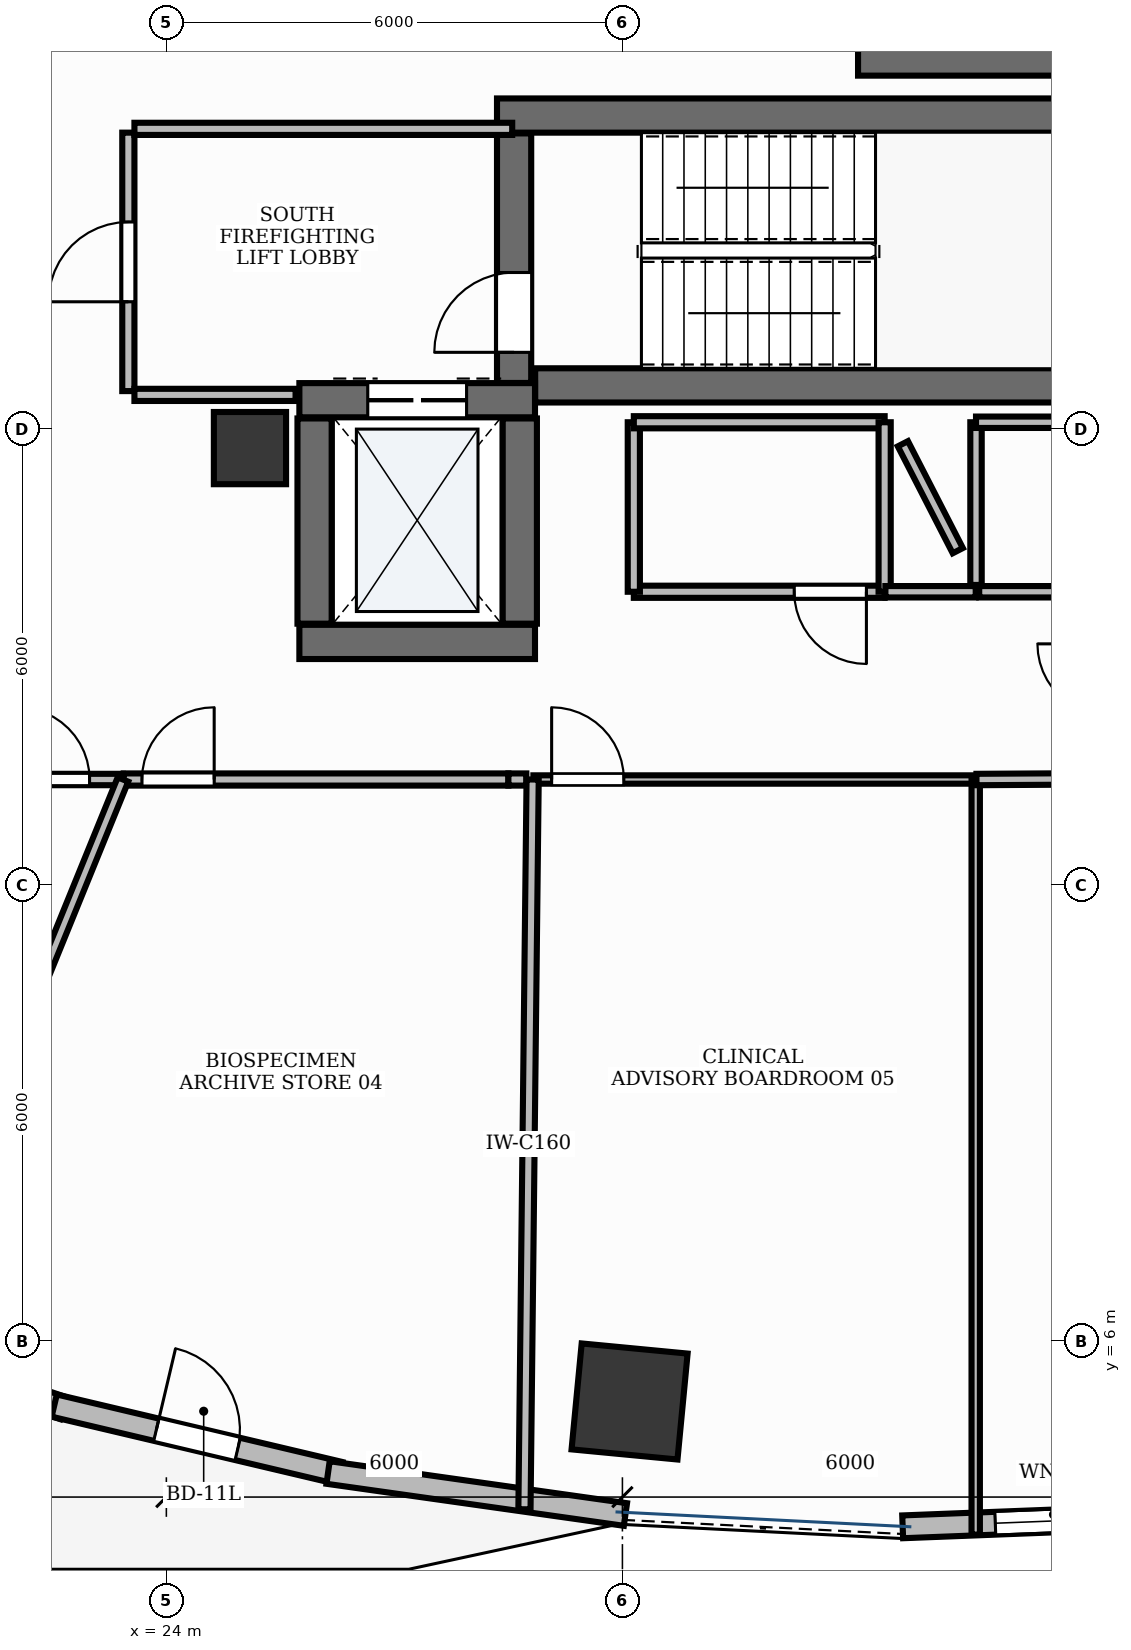
"""IFC4 building model, lengths in metres.
Left out: names, types, materials, properties, quantities, classifications, styles, units other than length and angle.
Written with IfcOpenShell. Run it as: python <this file> out.ifc"""

import sys

from ifc_helpers import new_model, si_unit, direction, frame, frame_2d, origin, origin_2d, place, context, subcontext, project, spatial, rectangle, extrude, element, fill, save


model = new_model("IFC4")
c1 = context("Model", 3, precision=1e-05, world=origin(), true_north=direction((0.0, 1.0)))
c2 = subcontext(c1, "Body", "Model", "MODEL_VIEW")
j1 = project(units=[si_unit("LENGTHUNIT", "METRE"), si_unit("PLANEANGLEUNIT", "RADIAN")], contexts=[c1])
p1 = place(None, origin())
s1 = spatial("IfcSite", under=j1, at=p1, CompositionType="ELEMENT")
p2 = place(p1, origin())
s2 = spatial("IfcBuilding", under=s1, at=p2, CompositionType="ELEMENT")
p3 = place(p2, frame((0.0, 0.0, 38.4)))
s3 = spatial("IfcBuildingStorey", under=s2, at=p3, CompositionType="ELEMENT", Elevation=38.4)
p4 = place(p3, frame((28.852, 18.575, 0.0), z_axis=(0.0, 0.0, 1.0), x_axis=(1.0, 0.0, 0.0)))
e1 = element("IfcWall", 1, at=p4, inside=s3, PredefinedType="SHEAR", context=c2, shape_type="SweptSolid", body=[
    extrude(rectangle(XDim=8.248, YDim=0.45, at=frame_2d((4.124, 0.0))), origin(), (0.0, 0.0, 1.0), 3.9),
])
p5 = place(p3, frame((28.35, 22.125, 0.0), z_axis=(0.0, 0.0, 1.0), x_axis=(1.0, 0.0, 0.0)))
e2 = element("IfcWall", 2, at=p5, inside=s3, PredefinedType="SHEAR", context=c2, shape_type="SweptSolid", body=[
    extrude(rectangle(XDim=8.75, YDim=0.45, at=frame_2d((4.375, 0.0))), origin(), (0.0, 0.0, 1.0), 3.9),
])
p6 = place(p3, frame((28.575, 18.607, 0.0), z_axis=(0.0, 0.0, 1.0), x_axis=(0.0, 1.0, 0.0)))
e3 = element("IfcWall", 3, at=p6, inside=s3, PredefinedType="SHEAR", context=c2, shape_type="SweptSolid", body=[
    extrude(rectangle(XDim=3.283, YDim=0.45, at=frame_2d((1.642, 0.0))), origin(), (0.0, 0.0, 1.0), 3.9),
])
p7 = place(p6, frame((0.403, 0.0, 0.0)))
e4 = element("IfcOpeningElement", 4, at=p7, cuts=e3, PredefinedType="OPENING", context=c2, shape_type="SweptSolid", body=[
    extrude(rectangle(XDim=1.05, YDim=2.15, at=frame_2d((0.525, 1.075))), frame((0.0, 0.24, 0.0), z_axis=(0.0, -1.0, 0.0), x_axis=(1.0, 0.0, 0.0)), (0.0, 0.0, 1.0), 0.48),
])
p8 = place(p3, frame((33.1, 22.875, 0.0), z_axis=(0.0, 0.0, 1.0), x_axis=(1.0, 0.0, 0.0)))
e5 = element("IfcWall", 5, at=p8, inside=s3, PredefinedType="SHEAR", context=c2, shape_type="SweptSolid", body=[
    extrude(rectangle(XDim=4.0, YDim=0.45, at=frame_2d((2.0, 0.0))), origin(), (0.0, 0.0, 1.0), 3.9),
])
p9 = place(p3, frame((25.75, 15.2, 0.0), z_axis=(0.0, 0.0, 1.0), x_axis=(1.0, 0.0, 0.0)))
e6 = element("IfcWall", 6, at=p9, inside=s3, PredefinedType="SHEAR", context=c2, shape_type="SweptSolid", body=[
    extrude(rectangle(XDim=3.1, YDim=0.45, at=frame_2d((1.55, 0.0))), origin(), (0.0, 0.0, 1.0), 3.9),
])
p10 = place(p3, frame((25.75, 18.38, 0.0), z_axis=(0.0, 0.0, 1.0), x_axis=(1.0, 0.0, 0.0)))
e7 = element("IfcWall", 7, at=p10, inside=s3, PredefinedType="SHEAR", context=c2, shape_type="SweptSolid", body=[
    extrude(rectangle(XDim=3.1, YDim=0.45, at=frame_2d((1.55, 0.0))), origin(), (0.0, 0.0, 1.0), 3.9),
])
p11 = place(p10, frame((0.9, 0.0, 0.0)))
e8 = element("IfcOpeningElement", 8, at=p11, cuts=e7, PredefinedType="OPENING", context=c2, shape_type="SweptSolid", body=[
    extrude(rectangle(XDim=1.3, YDim=2.2, at=frame_2d((0.65, 1.1))), frame((0.0, 0.24, 0.0), z_axis=(0.0, -1.0, 0.0), x_axis=(1.0, 0.0, 0.0)), (0.0, 0.0, 1.0), 0.48),
])
for number, where, z_axis, x_axis in (
    (9, (25.95, 15.44, 0.0), (0.0, 0.0, 1.0), (0.0, 1.0, 0.0)),
    (10, (28.65, 15.44, 0.0), (0.0, 0.0, 1.0), (0.0, 1.0, 0.0)),
):
    element("IfcWall", number, at=place(p3, frame(where, z_axis=z_axis, x_axis=x_axis)), inside=s3, PredefinedType="SHEAR", context=c2, shape_type="SweptSolid", body=[
        extrude(rectangle(XDim=2.7, YDim=0.45, at=frame_2d((1.35, 0.0))), origin(), (0.0, 0.0, 1.0), 3.9),
    ])
p12 = place(p3, frame((25.1, 17.75, -0.0), z_axis=(0.0, 0.0, 1.0), x_axis=(1.0, 0.0, 0.0)))
e11 = element("IfcColumn", 11, at=p12, inside=s3, PredefinedType="PILASTER", context=c2, shape_type="SweptSolid", body=[
    extrude(rectangle(XDim=0.95, YDim=0.95, at=origin_2d()), origin(), (0.0, 0.0, 1.0), 3.901),
])
p13 = place(p3, frame((30.094, 5.208, -0.0), z_axis=(0.0, 0.0, 1.0), x_axis=(-0.995462868748, 0.095150811579, 0.0)))
e12 = element("IfcColumn", 12, at=p13, inside=s3, PredefinedType="COLUMN", context=c2, shape_type="SweptSolid", body=[
    extrude(rectangle(XDim=1.4, YDim=1.4, at=origin_2d()), origin(), (0.0, 0.0, 1.0), 3.901),
])
p14 = place(p3, frame((19.065, 6.333, 0.0), z_axis=(0.0, 0.0, 1.0), x_axis=(0.947034337234, -0.321132315564, 0.0)))
e13 = element("IfcWall", 13, at=p14, inside=s3, PredefinedType="STANDARD", context=c2, shape_type="SweptSolid", body=[
    extrude(rectangle(XDim=3.79, YDim=0.3, at=frame_2d((1.895, 0.0))), origin(), (0.0, 0.0, 1.0), 3.47),
])
p15 = place(p14, frame((1.866, 0.0, 0.95)))
e14 = element("IfcOpeningElement", 14, at=p15, cuts=e13, PredefinedType="OPENING", context=c2, shape_type="SweptSolid", body=[
    extrude(rectangle(XDim=1.5, YDim=1.8, at=frame_2d((0.75, 0.9))), frame((0.0, 0.165, 0.0), z_axis=(0.0, -1.0, 0.0), x_axis=(1.0, 0.0, 0.0)), (0.0, 0.0, 1.0), 0.33),
])
p16 = place(p3, frame((22.525, 5.153, 0.0), z_axis=(0.0, 0.0, 1.0), x_axis=(0.973186156802, -0.230018921417, 0.0)))
e15 = element("IfcWall", 15, at=p16, inside=s3, PredefinedType="STANDARD", context=c2, shape_type="SweptSolid", body=[
    extrude(rectangle(XDim=3.861, YDim=0.3, at=frame_2d((1.931, 0.0))), origin(), (0.0, 0.0, 1.0), 3.9),
])
p17 = place(p16, frame((1.381, 0.0, 0.0)))
e16 = element("IfcOpeningElement", 16, at=p17, cuts=e15, PredefinedType="OPENING", context=c2, shape_type="SweptSolid", body=[
    extrude(rectangle(XDim=1.1, YDim=2.15, at=frame_2d((0.55, 1.075))), frame((0.0, 0.165, 0.0), z_axis=(0.0, -1.0, 0.0), x_axis=(1.0, 0.0, 0.0)), (0.0, 0.0, 1.0), 0.33),
])
p18 = place(p3, frame((33.687, 3.558, 0.0), z_axis=(0.0, 0.0, 1.0), x_axis=(0.999247008469, 0.038799691558, 0.0)))
e17 = element("IfcWall", 17, at=p18, inside=s3, PredefinedType="STANDARD", context=c2, shape_type="SweptSolid", body=[
    extrude(rectangle(XDim=3.939, YDim=0.3, at=frame_2d((1.969, 0.0))), origin(), (0.0, 0.0, 1.0), 3.9),
])
p19 = place(p18, frame((1.219, 0.0, 0.95)))
e18 = element("IfcOpeningElement", 18, at=p19, cuts=e17, PredefinedType="OPENING", context=c2, shape_type="SweptSolid", body=[
    extrude(rectangle(XDim=1.5, YDim=1.8, at=frame_2d((0.75, 0.9))), frame((0.0, 0.165, 0.0), z_axis=(0.0, -1.0, 0.0), x_axis=(1.0, 0.0, 0.0)), (0.0, 0.0, 1.0), 0.33),
])
p20 = place(p3, frame((26.128, 4.273, 0.0), z_axis=(0.0, 0.0, 1.0), x_axis=(0.990165832998, -0.139898617443, 0.0)))
e19 = element("IfcWall", 19, at=p20, inside=s3, PredefinedType="STANDARD", context=c2, shape_type="SweptSolid", body=[
    extrude(rectangle(XDim=3.951, YDim=0.3, at=frame_2d((1.976, 0.0))), origin(), (0.0, 0.0, 1.0), 3.47),
])
p21 = place(p3, frame((23.5, 18.5, 0.0), z_axis=(0.0, 0.0, 1.0), x_axis=(0.0, 1.0, 0.0)))
e20 = element("IfcWall", 20, at=p21, inside=s3, PredefinedType="PARTITIONING", context=c2, shape_type="SweptSolid", body=[
    extrude(rectangle(XDim=3.4, YDim=0.16, at=frame_2d((1.7, 0.0))), origin(), (0.0, 0.0, 1.0), 2.91),
])
p22 = place(p21, frame((1.175, 0.0, 0.0)))
e21 = element("IfcOpeningElement", 21, at=p22, cuts=e20, PredefinedType="OPENING", context=c2, shape_type="SweptSolid", body=[
    extrude(rectangle(XDim=1.05, YDim=2.15, at=frame_2d((0.525, 1.075))), frame((0.0, 0.095, 0.0), z_axis=(0.0, -1.0, 0.0), x_axis=(1.0, 0.0, 0.0)), (0.0, 0.0, 1.0), 0.19),
])
p23 = place(p3, frame((23.58, 21.95, 0.0), z_axis=(0.0, 0.0, 1.0), x_axis=(1.0, 0.0, 0.0)))
e22 = element("IfcWall", 22, at=p23, inside=s3, PredefinedType="PARTITIONING", context=c2, shape_type="SweptSolid", body=[
    extrude(rectangle(XDim=4.97, YDim=0.16, at=frame_2d((2.485, 0.0))), origin(), (0.0, 0.0, 1.0), 2.91),
])
p24 = place(p3, frame((23.58, 18.45, 0.0), z_axis=(0.0, 0.0, 1.0), x_axis=(1.0, 0.0, 0.0)))
e23 = element("IfcWall", 23, at=p24, inside=s3, PredefinedType="PARTITIONING", context=c2, shape_type="SweptSolid", body=[
    extrude(rectangle(XDim=2.12, YDim=0.16, at=frame_2d((1.06, 0.0))), origin(), (0.0, 0.0, 1.0), 2.91),
])
p25 = place(p3, frame((33.45, 15.86, 0.0), z_axis=(0.0, 0.0, 1.0), x_axis=(-1.0, 0.0, 0.0)))
e24 = element("IfcWall", 24, at=p25, inside=s3, PredefinedType="PARTITIONING", context=c2, shape_type="SweptSolid", body=[
    extrude(rectangle(XDim=3.3, YDim=0.16, at=frame_2d((1.65, 0.0))), origin(), (0.0, 0.0, 1.0), 2.91),
])
p26 = place(p25, frame((0.24, 0.0, 0.0)))
e25 = element("IfcOpeningElement", 25, at=p26, cuts=e24, PredefinedType="OPENING", context=c2, shape_type="SweptSolid", body=[
    extrude(rectangle(XDim=0.95, YDim=2.15, at=frame_2d((0.475, 1.075))), frame((0.0, 0.095, 0.0), z_axis=(0.0, -1.0, 0.0), x_axis=(1.0, 0.0, 0.0)), (0.0, 0.0, 1.0), 0.19),
])
p27 = place(p3, frame((21.8, 13.39, 0.0), z_axis=(0.0, 0.0, 1.0), x_axis=(1.0, 0.0, 0.0)))
e26 = element("IfcWall", 26, at=p27, inside=s3, PredefinedType="PARTITIONING", context=c2, shape_type="SweptSolid", body=[
    extrude(rectangle(XDim=1.629, YDim=0.15, at=frame_2d((0.814, 0.0))), origin(), (0.0, 0.0, 1.0), 2.91),
])
p28 = place(p27, frame((0.24, 0.0, 0.0)))
e27 = element("IfcOpeningElement", 27, at=p28, cuts=e26, PredefinedType="OPENING", context=c2, shape_type="SweptSolid", body=[
    extrude(rectangle(XDim=0.95, YDim=2.15, at=frame_2d((0.475, 1.075))), frame((0.0, 0.09, 0.0), z_axis=(0.0, -1.0, 0.0), x_axis=(1.0, 0.0, 0.0)), (0.0, 0.0, 1.0), 0.18),
])
p29 = place(p3, frame((23.439, 13.39, 0.0), z_axis=(0.0, 0.0, 1.0), x_axis=(1.0, 0.0, 0.0)))
e28 = element("IfcWall", 28, at=p29, inside=s3, PredefinedType="PARTITIONING", context=c2, shape_type="SweptSolid", body=[
    extrude(rectangle(XDim=5.061, YDim=0.16, at=frame_2d((2.53, 0.0))), origin(), (0.0, 0.0, 1.0), 2.91),
])
p30 = place(p29, frame((0.24, 0.0, 0.0)))
e29 = element("IfcOpeningElement", 29, at=p30, cuts=e28, PredefinedType="OPENING", context=c2, shape_type="SweptSolid", body=[
    extrude(rectangle(XDim=0.95, YDim=2.15, at=frame_2d((0.475, 1.075))), frame((0.0, 0.095, 0.0), z_axis=(0.0, -1.0, 0.0), x_axis=(1.0, 0.0, 0.0)), (0.0, 0.0, 1.0), 0.19),
])
p31 = place(p3, frame((28.829, 13.39, 0.0), z_axis=(0.0, 0.0, 1.0), x_axis=(1.0, 0.0, 0.0)))
e30 = element("IfcWall", 30, at=p31, inside=s3, PredefinedType="MOVABLE", context=c2, shape_type="SweptSolid", body=[
    extrude(rectangle(XDim=5.819, YDim=0.11, at=frame_2d((2.91, 0.0))), origin(), (0.0, 0.0, 1.0), 2.91),
])
p32 = place(p31, frame((0.24, 0.0, 0.0)))
e31 = element("IfcOpeningElement", 31, at=p32, cuts=e30, PredefinedType="OPENING", context=c2, shape_type="SweptSolid", body=[
    extrude(rectangle(XDim=0.95, YDim=2.15, at=frame_2d((0.475, 1.075))), frame((0.0, 0.07, 0.0), z_axis=(0.0, -1.0, 0.0), x_axis=(1.0, 0.0, 0.0)), (0.0, 0.0, 1.0), 0.14),
])
p33 = place(p3, frame((30.15, 15.86, 0.0), z_axis=(0.0, 0.0, 1.0), x_axis=(0.0, 1.0, 0.0)))
e32 = element("IfcWall", 32, at=p33, inside=s3, PredefinedType="PARTITIONING", context=c2, shape_type="SweptSolid", body=[
    extrude(rectangle(XDim=2.23, YDim=0.16, at=frame_2d((1.115, 0.0))), origin(), (0.0, 0.0, 1.0), 2.91),
])
p34 = place(p3, frame((30.15, 18.09, 0.0), z_axis=(0.0, 0.0, 1.0), x_axis=(1.0, 0.0, 0.0)))
e33 = element("IfcWall", 33, at=p34, inside=s3, PredefinedType="PARTITIONING", context=c2, shape_type="SweptSolid", body=[
    extrude(rectangle(XDim=3.3, YDim=0.16, at=frame_2d((1.65, 0.0))), origin(), (0.0, 0.0, 1.0), 2.91),
])
p35 = place(p3, frame((33.45, 18.09, 0.0), z_axis=(0.0, 0.0, 1.0), x_axis=(0.0, -1.0, 0.0)))
e34 = element("IfcWall", 34, at=p35, inside=s3, PredefinedType="PARTITIONING", context=c2, shape_type="SweptSolid", body=[
    extrude(rectangle(XDim=2.23, YDim=0.16, at=frame_2d((1.115, 0.0))), origin(), (0.0, 0.0, 1.0), 2.91),
])
p36 = place(p3, frame((23.429, 13.39, 0.0), z_axis=(0.0, 0.0, 1.0), x_axis=(-0.377151920135, -0.926151407243, 0.0)))
e35 = element("IfcWall", 35, at=p36, inside=s3, PredefinedType="PARTITIONING", context=c2, shape_type="SweptSolid", body=[
    extrude(rectangle(XDim=8.239, YDim=0.15, at=frame_2d((4.119, 0.0))), origin(), (0.0, 0.0, 1.0), 2.91),
])
p37 = place(p3, frame((28.5, 13.39, 0.0), z_axis=(0.0, 0.0, 1.0), x_axis=(1.0, 0.0, 0.0)))
e36 = element("IfcWall", 36, at=p37, inside=s3, PredefinedType="PARTITIONING", context=c2, shape_type="SweptSolid", body=[
    extrude(rectangle(XDim=0.236, YDim=0.16, at=frame_2d((0.118, 0.0))), origin(), (0.0, 0.0, 1.0), 2.91),
])
p38 = place(p3, frame((28.819, 13.39, 0.0), z_axis=(0.0, 0.0, 1.0), x_axis=(-0.011213820346, -0.99993712314, 0.0)))
e37 = element("IfcWall", 37, at=p38, inside=s3, PredefinedType="PARTITIONING", context=c2, shape_type="SweptSolid", body=[
    extrude(rectangle(XDim=9.601, YDim=0.16, at=frame_2d((4.801, 0.0))), origin(), (0.0, 0.0, 1.0), 2.91),
])
p39 = place(p3, frame((34.648, 13.39, 0.0), z_axis=(0.0, 0.0, 1.0), x_axis=(0.0, -1.0, 0.0)))
e38 = element("IfcWall", 38, at=p39, inside=s3, PredefinedType="MOVABLE", context=c2, shape_type="SweptSolid", body=[
    extrude(rectangle(XDim=9.934, YDim=0.11, at=frame_2d((4.967, 0.0))), origin(), (0.0, 0.0, 1.0), 2.91),
])
p40 = place(p3, frame((34.652, 15.95, 0.0), z_axis=(0.0, 0.0, 1.0), x_axis=(0.0, 1.0, 0.0)))
e39 = element("IfcWall", 39, at=p40, inside=s3, PredefinedType="PARTITIONING", context=c2, shape_type="SweptSolid", body=[
    extrude(rectangle(XDim=2.14, YDim=0.15, at=frame_2d((1.07, 0.0))), origin(), (0.0, 0.0, 1.0), 2.91),
])
p41 = place(p3, frame((34.652, 18.09, 0.0), z_axis=(0.0, 0.0, 1.0), x_axis=(1.0, 0.0, 0.0)))
e40 = element("IfcWall", 40, at=p41, inside=s3, PredefinedType="PARTITIONING", context=c2, shape_type="SweptSolid", body=[
    extrude(rectangle(XDim=2.698, YDim=0.15, at=frame_2d((1.349, 0.0))), origin(), (0.0, 0.0, 1.0), 2.91),
])
p42 = place(p3, frame((34.658, 13.39, 0.0), z_axis=(0.0, 0.0, 1.0), x_axis=(0.999983490307, 0.005746226083, 0.0)))
e41 = element("IfcWall", 41, at=p42, inside=s3, PredefinedType="PARTITIONING", context=c2, shape_type="SweptSolid", body=[
    extrude(rectangle(XDim=1.742, YDim=0.15, at=frame_2d((0.871, 0.0))), origin(), (0.0, 0.0, 1.0), 2.91),
])
p43 = place(p3, frame((36.4, 15.86, 0.0), z_axis=(0.0, 0.0, 1.0), x_axis=(-1.0, 0.0, 0.0)))
e42 = element("IfcWall", 42, at=p43, inside=s3, PredefinedType="PARTITIONING", context=c2, shape_type="SweptSolid", body=[
    extrude(rectangle(XDim=1.706, YDim=0.15, at=frame_2d((0.853, 0.0))), origin(), (0.0, 0.0, 1.0), 2.91),
])
p44 = place(p3, frame((34.648, 15.86, 0.0), z_axis=(0.0, 0.0, 1.0), x_axis=(-1.0, 0.0, 0.0)))
e43 = element("IfcWall", 43, at=p44, inside=s3, PredefinedType="PARTITIONING", context=c2, shape_type="SweptSolid", body=[
    extrude(rectangle(XDim=1.188, YDim=0.15, at=frame_2d((0.594, 0.0))), origin(), (0.0, 0.0, 1.0), 2.91),
])
p45 = place(p3, frame((33.69, 17.807, 0.0), z_axis=(0.0, 0.0, 1.0), x_axis=(0.45676175153, -0.889589063747, 0.0)))
e44 = element("IfcWall", 44, at=p45, inside=s3, PredefinedType="PARTITIONING", context=c2, shape_type="SweptSolid", body=[
    extrude(rectangle(XDim=1.581, YDim=0.15, at=frame_2d((0.791, 0.0))), origin(), (0.0, 0.0, 1.0), 2.91),
])
p46 = place(p17, origin())
e45 = element("IfcDoor", 45, at=p46, inside=s3, OperationType="SINGLE_SWING_LEFT", PredefinedType="DOOR", context=c2, shape_type="SweptSolid", body=[
    extrude(rectangle(XDim=1.1, YDim=2.15, at=frame_2d((0.55, 1.075))), frame((0.0, 0.025, 0.0), z_axis=(0.0, -1.0, 0.0), x_axis=(1.0, 0.0, 0.0)), (0.0, 0.0, 1.0), 0.05),
])
fill(e16, e45)
p47 = place(p19, origin())
e46 = element("IfcWindow", 46, at=p47, inside=s3, PartitioningType="DOUBLE_PANEL_VERTICAL", PredefinedType="WINDOW", context=c2, shape_type="SweptSolid", body=[
    extrude(rectangle(XDim=1.5, YDim=1.8, at=frame_2d((0.75, 0.9))), frame((0.0, 0.03, 0.0), z_axis=(0.0, -1.0, 0.0), x_axis=(1.0, 0.0, 0.0)), (0.0, 0.0, 1.0), 0.06),
])
fill(e18, e46)
p48 = place(p7, origin())
e47 = element("IfcDoor", 47, at=p48, inside=s3, OperationType="SINGLE_SWING_LEFT", PredefinedType="DOOR", context=c2, shape_type="SweptSolid", body=[
    extrude(rectangle(XDim=1.05, YDim=2.15, at=frame_2d((0.525, 1.075))), frame((0.0, 0.025, 0.0), z_axis=(0.0, -1.0, 0.0), x_axis=(1.0, 0.0, 0.0)), (0.0, 0.0, 1.0), 0.05),
])
fill(e4, e47)
p49 = place(p11, origin())
e48 = element("IfcDoor", 48, at=p49, inside=s3, OperationType="DOUBLE_DOOR_SLIDING", PredefinedType="DOOR", context=c2, shape_type="SweptSolid", body=[
    extrude(rectangle(XDim=1.3, YDim=2.2, at=frame_2d((0.65, 1.1))), frame((0.0, 0.025, 0.0), z_axis=(0.0, -1.0, 0.0), x_axis=(1.0, 0.0, 0.0)), (0.0, 0.0, 1.0), 0.05),
])
fill(e8, e48)
p50 = place(p22, origin())
e49 = element("IfcDoor", 49, at=p50, inside=s3, OperationType="SINGLE_SWING_LEFT", PredefinedType="DOOR", context=c2, shape_type="SweptSolid", body=[
    extrude(rectangle(XDim=1.05, YDim=2.15, at=frame_2d((0.525, 1.075))), frame((0.0, 0.025, 0.0), z_axis=(0.0, -1.0, 0.0), x_axis=(1.0, 0.0, 0.0)), (0.0, 0.0, 1.0), 0.05),
])
fill(e21, e49)
p51 = place(p26, origin())
e50 = element("IfcDoor", 50, at=p51, inside=s3, OperationType="SINGLE_SWING_LEFT", PredefinedType="DOOR", context=c2, shape_type="SweptSolid", body=[
    extrude(rectangle(XDim=0.95, YDim=2.15, at=frame_2d((0.475, 1.075))), frame((0.0, 0.025, 0.0), z_axis=(0.0, -1.0, 0.0), x_axis=(1.0, 0.0, 0.0)), (0.0, 0.0, 1.0), 0.05),
])
fill(e25, e50)
p52 = place(p28, origin())
e51 = element("IfcDoor", 51, at=p52, inside=s3, OperationType="SINGLE_SWING_LEFT", PredefinedType="DOOR", context=c2, shape_type="SweptSolid", body=[
    extrude(rectangle(XDim=0.95, YDim=2.15, at=frame_2d((0.475, 1.075))), frame((0.0, 0.025, 0.0), z_axis=(0.0, -1.0, 0.0), x_axis=(1.0, 0.0, 0.0)), (0.0, 0.0, 1.0), 0.05),
])
fill(e27, e51)
p53 = place(p30, origin())
e52 = element("IfcDoor", 52, at=p53, inside=s3, OperationType="SINGLE_SWING_RIGHT", PredefinedType="DOOR", context=c2, shape_type="SweptSolid", body=[
    extrude(rectangle(XDim=0.95, YDim=2.15, at=frame_2d((0.475, 1.075))), frame((0.0, 0.025, 0.0), z_axis=(0.0, -1.0, 0.0), x_axis=(1.0, 0.0, 0.0)), (0.0, 0.0, 1.0), 0.05),
])
fill(e29, e52)
p54 = place(p32, origin())
e53 = element("IfcDoor", 53, at=p54, inside=s3, OperationType="SINGLE_SWING_LEFT", PredefinedType="DOOR", context=c2, shape_type="SweptSolid", body=[
    extrude(rectangle(XDim=0.95, YDim=2.15, at=frame_2d((0.475, 1.075))), frame((0.0, 0.025, 0.0), z_axis=(0.0, -1.0, 0.0), x_axis=(1.0, 0.0, 0.0)), (0.0, 0.0, 1.0), 0.05),
])
fill(e31, e53)
save(model, sys.argv[1])
